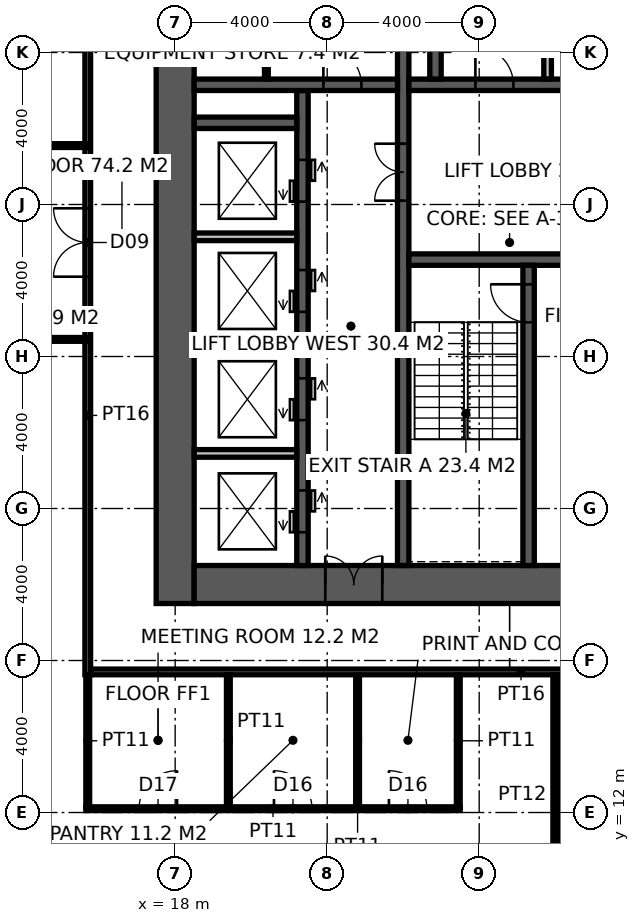
"""IFC4 building model, lengths in metres.
Left out: names, types, materials, properties, quantities, classifications, styles, units other than length and angle.
Written with IfcOpenShell. Run it as: python <this file> out.ifc"""

import sys

from ifc_helpers import new_model, si_unit, direction, frame, frame_2d, origin, place, context, subcontext, project, spatial, rectangle, extrude, element, fill, save


model = new_model("IFC4")
c1 = context("Model", 3, precision=1e-05, world=origin(), true_north=direction((0.0, 1.0)))
c2 = subcontext(c1, "Body", "Model", "MODEL_VIEW")
j1 = project(units=[si_unit("LENGTHUNIT", "METRE"), si_unit("PLANEANGLEUNIT", "RADIAN")], contexts=[c1])
p1 = place(None, origin())
s1 = spatial("IfcSite", under=j1, at=p1, CompositionType="ELEMENT")
p2 = place(p1, origin())
s2 = spatial("IfcBuilding", under=s1, at=p2, CompositionType="ELEMENT")
p3 = place(p2, frame((0.0, 0.0, 230.2)))
s3 = spatial("IfcBuildingStorey", under=s2, at=p3, CompositionType="ELEMENT", Elevation=230.2)
p4 = place(p3, frame((18.0, 17.5, -0.15), z_axis=(0.0, 0.0, 1.0), x_axis=(0.0, 1.0, 0.0)))
e1 = element("IfcWall", 1, at=p4, inside=s3, PredefinedType="SHEAR", context=c2, shape_type="SweptSolid", body=[
    extrude(rectangle(XDim=19.0, YDim=1.0, at=frame_2d((9.5, 0.0))), origin(), (0.0, 0.0, 1.0), 4.0),
])
p5 = place(p3, frame((18.5, 18.0, -0.15), z_axis=(0.0, 0.0, 1.0), x_axis=(1.0, 0.0, 0.0)))
e2 = element("IfcWall", 2, at=p5, inside=s3, PredefinedType="SHEAR", context=c2, shape_type="SweptSolid", body=[
    extrude(rectangle(XDim=17.6, YDim=1.0, at=frame_2d((8.8, 0.0))), origin(), (0.0, 0.0, 1.0), 4.0),
])
p6 = place(p5, frame((3.45, 0.0, 0.15)))
e3 = element("IfcOpeningElement", 3, at=p6, cuts=e2, PredefinedType="OPENING", context=c2, shape_type="SweptSolid", body=[
    extrude(rectangle(XDim=1.5, YDim=2.4, at=frame_2d((0.75, 1.2))), frame((0.0, 0.51, 0.0), z_axis=(0.0, -1.0, 0.0), x_axis=(1.0, 0.0, 0.0)), (0.0, 0.0, 1.0), 1.02),
])
p7 = place(p3, frame((24.0, 18.5, -0.15), z_axis=(0.0, 0.0, 1.0), x_axis=(0.0, 1.0, 0.0)))
e4 = element("IfcWall", 4, at=p7, inside=s3, PredefinedType="SHEAR", context=c2, shape_type="SweptSolid", body=[
    extrude(rectangle(XDim=17.0, YDim=0.3, at=frame_2d((8.5, 0.0))), origin(), (0.0, 0.0, 1.0), 4.0),
])
p8 = place(p7, frame((9.6, 0.0, 0.15)))
e5 = element("IfcOpeningElement", 5, at=p8, cuts=e4, PredefinedType="OPENING", context=c2, shape_type="SweptSolid", body=[
    extrude(rectangle(XDim=1.5, YDim=2.4, at=frame_2d((0.75, 1.2))), frame((0.0, 0.16, 0.0), z_axis=(0.0, -1.0, 0.0), x_axis=(1.0, 0.0, 0.0)), (0.0, 0.0, 1.0), 0.32),
])
p9 = place(p3, frame((24.15, 26.55, -0.15), z_axis=(0.0, 0.0, 1.0), x_axis=(1.0, 0.0, 0.0)))
e6 = element("IfcWall", 6, at=p9, inside=s3, PredefinedType="SHEAR", context=c2, shape_type="SweptSolid", body=[
    extrude(rectangle(XDim=11.25, YDim=0.3, at=frame_2d((5.625, 0.0))), origin(), (0.0, 0.0, 1.0), 4.0),
])
p10 = place(p9, frame((9.25, 0.0, 0.15)))
e7 = element("IfcOpeningElement", 7, at=p10, cuts=e6, PredefinedType="OPENING", context=c2, shape_type="SweptSolid", body=[
    extrude(rectangle(XDim=1.0, YDim=2.2, at=frame_2d((0.5, 1.1))), frame((0.0, 0.16, 0.0), z_axis=(0.0, -1.0, 0.0), x_axis=(1.0, 0.0, 0.0)), (0.0, 0.0, 1.0), 0.32),
])
p11 = place(p9, frame((4.9, 0.0, 0.15)))
e8 = element("IfcOpeningElement", 8, at=p11, cuts=e6, PredefinedType="OPENING", context=c2, shape_type="SweptSolid", body=[
    extrude(rectangle(XDim=1.5, YDim=2.4, at=frame_2d((0.75, 1.2))), frame((0.0, 0.16, 0.0), z_axis=(0.0, -1.0, 0.0), x_axis=(1.0, 0.0, 0.0)), (0.0, 0.0, 1.0), 0.32),
])
p12 = place(p3, frame((27.3, 18.5, -0.15), z_axis=(0.0, 0.0, 1.0), x_axis=(0.0, 1.0, 0.0)))
e9 = element("IfcWall", 9, at=p12, inside=s3, PredefinedType="SHEAR", context=c2, shape_type="SweptSolid", body=[
    extrude(rectangle(XDim=7.9, YDim=0.3, at=frame_2d((3.95, 0.0))), origin(), (0.0, 0.0, 1.0), 4.0),
])
p13 = place(p12, frame((6.4, 0.0, 0.15)))
e10 = element("IfcOpeningElement", 10, at=p13, cuts=e9, PredefinedType="OPENING", context=c2, shape_type="SweptSolid", body=[
    extrude(rectangle(XDim=1.0, YDim=2.2, at=frame_2d((0.5, 1.1))), frame((0.0, 0.16, 0.0), z_axis=(0.0, -1.0, 0.0), x_axis=(1.0, 0.0, 0.0)), (0.0, 0.0, 1.0), 0.32),
])
p14 = place(p3, frame((24.15, 31.15, -0.15), z_axis=(0.0, 0.0, 1.0), x_axis=(1.0, 0.0, 0.0)))
e11 = element("IfcWall", 11, at=p14, inside=s3, PredefinedType="SHEAR", context=c2, shape_type="SweptSolid", body=[
    extrude(rectangle(XDim=11.25, YDim=0.3, at=frame_2d((5.625, 0.0))), origin(), (0.0, 0.0, 1.0), 4.0),
])
p15 = place(p14, frame((1.75, 0.0, 0.15)))
e12 = element("IfcOpeningElement", 12, at=p15, cuts=e11, PredefinedType="OPENING", context=c2, shape_type="SweptSolid", body=[
    extrude(rectangle(XDim=1.0, YDim=2.2, at=frame_2d((0.5, 1.1))), frame((0.0, 0.16, 0.0), z_axis=(0.0, -1.0, 0.0), x_axis=(1.0, 0.0, 0.0)), (0.0, 0.0, 1.0), 0.32),
])
p16 = place(p14, frame((4.55, 0.0, 0.15)))
e13 = element("IfcOpeningElement", 13, at=p16, cuts=e11, PredefinedType="OPENING", context=c2, shape_type="SweptSolid", body=[
    extrude(rectangle(XDim=1.0, YDim=2.2, at=frame_2d((0.5, 1.1))), frame((0.0, 0.16, 0.0), z_axis=(0.0, -1.0, 0.0), x_axis=(1.0, 0.0, 0.0)), (0.0, 0.0, 1.0), 0.32),
])
p17 = place(p14, frame((7.25, 0.0, 0.15)))
e14 = element("IfcOpeningElement", 14, at=p17, cuts=e11, PredefinedType="OPENING", context=c2, shape_type="SweptSolid", body=[
    extrude(rectangle(XDim=1.4, YDim=2.4, at=frame_2d((0.7, 1.2))), frame((0.0, 0.16, 0.0), z_axis=(0.0, -1.0, 0.0), x_axis=(1.0, 0.0, 0.0)), (0.0, 0.0, 1.0), 0.32),
])
p18 = place(p3, frame((21.35, 18.5, -0.15), z_axis=(0.0, 0.0, 1.0), x_axis=(0.0, 1.0, 0.0)))
e15 = element("IfcWall", 15, at=p18, inside=s3, PredefinedType="SHEAR", context=c2, shape_type="SweptSolid", body=[
    extrude(rectangle(XDim=12.5, YDim=0.3, at=frame_2d((6.25, 0.0))), origin(), (0.0, 0.0, 1.0), 4.0),
])
p19 = place(p18, frame((0.875, 0.0, 0.15)))
e16 = element("IfcOpeningElement", 16, at=p19, cuts=e15, PredefinedType="OPENING", context=c2, shape_type="SweptSolid", body=[
    extrude(rectangle(XDim=1.1, YDim=2.2, at=frame_2d((0.55, 1.1))), frame((0.0, 0.16, 0.0), z_axis=(0.0, -1.0, 0.0), x_axis=(1.0, 0.0, 0.0)), (0.0, 0.0, 1.0), 0.32),
])
p20 = place(p18, frame((3.825, 0.0, 0.15)))
e17 = element("IfcOpeningElement", 17, at=p20, cuts=e15, PredefinedType="OPENING", context=c2, shape_type="SweptSolid", body=[
    extrude(rectangle(XDim=1.1, YDim=2.2, at=frame_2d((0.55, 1.1))), frame((0.0, 0.16, 0.0), z_axis=(0.0, -1.0, 0.0), x_axis=(1.0, 0.0, 0.0)), (0.0, 0.0, 1.0), 0.32),
])
p21 = place(p18, frame((6.675, 0.0, 0.15)))
e18 = element("IfcOpeningElement", 18, at=p21, cuts=e15, PredefinedType="OPENING", context=c2, shape_type="SweptSolid", body=[
    extrude(rectangle(XDim=1.1, YDim=2.2, at=frame_2d((0.55, 1.1))), frame((0.0, 0.16, 0.0), z_axis=(0.0, -1.0, 0.0), x_axis=(1.0, 0.0, 0.0)), (0.0, 0.0, 1.0), 0.32),
])
p22 = place(p18, frame((9.575, 0.0, 0.15)))
e19 = element("IfcOpeningElement", 19, at=p22, cuts=e15, PredefinedType="OPENING", context=c2, shape_type="SweptSolid", body=[
    extrude(rectangle(XDim=1.1, YDim=2.2, at=frame_2d((0.55, 1.1))), frame((0.0, 0.16, 0.0), z_axis=(0.0, -1.0, 0.0), x_axis=(1.0, 0.0, 0.0)), (0.0, 0.0, 1.0), 0.32),
])
p23 = place(p3, frame((18.5, 31.15, -0.15), z_axis=(0.0, 0.0, 1.0), x_axis=(1.0, 0.0, 0.0)))
e20 = element("IfcWall", 20, at=p23, inside=s3, PredefinedType="SHEAR", context=c2, shape_type="SweptSolid", body=[
    extrude(rectangle(XDim=5.35, YDim=0.3, at=frame_2d((2.675, 0.0))), origin(), (0.0, 0.0, 1.0), 4.0),
])
p24 = place(p23, frame((3.4, 0.0, 0.15)))
e21 = element("IfcOpeningElement", 21, at=p24, cuts=e20, PredefinedType="OPENING", context=c2, shape_type="SweptSolid", body=[
    extrude(rectangle(XDim=1.0, YDim=2.2, at=frame_2d((0.5, 1.1))), frame((0.0, 0.16, 0.0), z_axis=(0.0, -1.0, 0.0), x_axis=(1.0, 0.0, 0.0)), (0.0, 0.0, 1.0), 0.32),
])
p25 = place(p3, frame((18.5, 30.15, -0.15), z_axis=(0.0, 0.0, 1.0), x_axis=(1.0, 0.0, 0.0)))
e22 = element("IfcWall", 22, at=p25, inside=s3, PredefinedType="SHEAR", context=c2, shape_type="SweptSolid", body=[
    extrude(rectangle(XDim=2.7, YDim=0.3, at=frame_2d((1.35, 0.0))), origin(), (0.0, 0.0, 1.0), 4.0),
])
p26 = place(p3, frame((24.85, 31.3, -0.15), z_axis=(0.0, 0.0, 1.0), x_axis=(0.0, 1.0, 0.0)))
e23 = element("IfcWall", 23, at=p26, inside=s3, PredefinedType="SHEAR", context=c2, shape_type="SweptSolid", body=[
    extrude(rectangle(XDim=4.2, YDim=0.3, at=frame_2d((2.1, 0.0))), origin(), (0.0, 0.0, 1.0), 4.0),
])
p27 = place(p3, frame((27.8, 31.3, -0.15), z_axis=(0.0, 0.0, 1.0), x_axis=(0.0, 1.0, 0.0)))
e24 = element("IfcWall", 24, at=p27, inside=s3, PredefinedType="SOLIDWALL", context=c2, shape_type="SweptSolid", body=[
    extrude(rectangle(XDim=2.8, YDim=0.2, at=frame_2d((1.4, 0.0))), origin(), (0.0, 0.0, 1.0), 4.0),
])
for number, where, z_axis, x_axis in (
    (25, (18.5, 21.45, -0.15), (0.0, 0.0, 1.0), (1.0, 0.0, 0.0)),
    (26, (18.5, 24.3, -0.15), (0.0, 0.0, 1.0), (1.0, 0.0, 0.0)),
    (27, (18.5, 27.15, -0.15), (0.0, 0.0, 1.0), (1.0, 0.0, 0.0)),
):
    element("IfcWall", number, at=place(p3, frame(where, z_axis=z_axis, x_axis=x_axis)), inside=s3, PredefinedType="SOLIDWALL", context=c2, shape_type="SweptSolid", body=[
        extrude(rectangle(XDim=2.7, YDim=0.2, at=frame_2d((1.35, 0.0))), origin(), (0.0, 0.0, 1.0), 4.0),
    ])
p28 = place(p3, frame((20.4, 31.3, 0.0), z_axis=(0.0, 0.0, 1.0), x_axis=(0.0, 1.0, 0.0)))
e28 = element("IfcWall", 28, at=p28, inside=s3, PredefinedType="PARTITIONING", context=c2, shape_type="SweptSolid", body=[
    extrude(rectangle(XDim=4.2, YDim=0.1, at=frame_2d((2.1, 0.0))), origin(), (0.0, 0.0, 1.0), 3.85),
])
p29 = place(p28, frame((1.55, 0.0, 0.0)))
e29 = element("IfcOpeningElement", 29, at=p29, cuts=e28, PredefinedType="OPENING", context=c2, shape_type="SweptSolid", body=[
    extrude(rectangle(XDim=1.0, YDim=2.2, at=frame_2d((0.5, 1.1))), frame((0.0, 0.06, 0.0), z_axis=(0.0, -1.0, 0.0), x_axis=(1.0, 0.0, 0.0)), (0.0, 0.0, 1.0), 0.12),
])
p30 = place(p3, frame((15.7, 15.625, 0.0), z_axis=(0.0, 0.0, 1.0), x_axis=(0.0, 1.0, 0.0)))
e30 = element("IfcWall", 30, at=p30, inside=s3, PredefinedType="PARTITIONING", context=c2, shape_type="SweptSolid", body=[
    extrude(rectangle(XDim=22.75, YDim=0.15, at=frame_2d((11.375, 0.0))), origin(), (0.0, 0.0, 1.0), 3.85),
])
p31 = place(p30, frame((10.475, 0.0, 0.0)))
e31 = element("IfcOpeningElement", 31, at=p31, cuts=e30, PredefinedType="OPENING", context=c2, shape_type="SweptSolid", body=[
    extrude(rectangle(XDim=1.8, YDim=2.4, at=frame_2d((0.9, 1.2))), frame((0.0, 0.085, 0.0), z_axis=(0.0, -1.0, 0.0), x_axis=(1.0, 0.0, 0.0)), (0.0, 0.0, 1.0), 0.17),
])
p32 = place(p3, frame((15.775, 15.7, 0.0), z_axis=(0.0, 0.0, 1.0), x_axis=(1.0, 0.0, 0.0)))
e32 = element("IfcWall", 32, at=p32, inside=s3, PredefinedType="PARTITIONING", context=c2, shape_type="SweptSolid", body=[
    extrude(rectangle(XDim=22.65, YDim=0.15, at=frame_2d((11.325, 0.0))), origin(), (0.0, 0.0, 1.0), 3.85),
])
p33 = place(p3, frame((28.0, 8.3, 0.0), z_axis=(0.0, 0.0, 1.0), x_axis=(0.0, 1.0, 0.0)))
e33 = element("IfcWall", 33, at=p33, inside=s3, PredefinedType="PARTITIONING", context=c2, shape_type="SweptSolid", body=[
    extrude(rectangle(XDim=7.325, YDim=0.12, at=frame_2d((3.663, 0.0))), origin(), (0.0, 0.0, 1.0), 3.85),
])
p34 = place(p3, frame((28.06, 11.4, 0.0), z_axis=(0.0, 0.0, 1.0), x_axis=(1.0, 0.0, 0.0)))
e34 = element("IfcWall", 34, at=p34, inside=s3, PredefinedType="PARTITIONING", context=c2, shape_type="SweptSolid", body=[
    extrude(rectangle(XDim=2.74, YDim=0.1, at=frame_2d((1.37, 0.0))), origin(), (0.0, 0.0, 1.0), 3.85),
])
p35 = place(p3, frame((15.65, 12.1, 0.0), z_axis=(0.0, 0.0, 1.0), x_axis=(1.0, 0.0, 0.0)))
e35 = element("IfcWall", 35, at=p35, inside=s3, PredefinedType="PARTITIONING", context=c2, shape_type="SweptSolid", body=[
    extrude(rectangle(XDim=9.85, YDim=0.1, at=frame_2d((4.925, 0.0))), origin(), (0.0, 0.0, 1.0), 3.85),
])
p36 = place(p35, frame((1.4, 0.0, 0.0)))
e36 = element("IfcOpeningElement", 36, at=p36, cuts=e35, PredefinedType="OPENING", context=c2, shape_type="SweptSolid", body=[
    extrude(rectangle(XDim=1.0, YDim=2.2, at=frame_2d((0.5, 1.1))), frame((0.0, 0.06, 0.0), z_axis=(0.0, -1.0, 0.0), x_axis=(1.0, 0.0, 0.0)), (0.0, 0.0, 1.0), 0.12),
])
p37 = place(p35, frame((4.95, 0.0, 0.0)))
e37 = element("IfcOpeningElement", 37, at=p37, cuts=e35, PredefinedType="OPENING", context=c2, shape_type="SweptSolid", body=[
    extrude(rectangle(XDim=1.0, YDim=2.2, at=frame_2d((0.5, 1.1))), frame((0.0, 0.06, 0.0), z_axis=(0.0, -1.0, 0.0), x_axis=(1.0, 0.0, 0.0)), (0.0, 0.0, 1.0), 0.12),
])
p38 = place(p35, frame((7.975, 0.0, 0.0)))
e38 = element("IfcOpeningElement", 38, at=p38, cuts=e35, PredefinedType="OPENING", context=c2, shape_type="SweptSolid", body=[
    extrude(rectangle(XDim=1.0, YDim=2.2, at=frame_2d((0.5, 1.1))), frame((0.0, 0.06, 0.0), z_axis=(0.0, -1.0, 0.0), x_axis=(1.0, 0.0, 0.0)), (0.0, 0.0, 1.0), 0.12),
])
p39 = place(p3, frame((28.061, 12.1, 0.0), z_axis=(0.0, 0.0, 1.0), x_axis=(1.0, 0.0, 0.0)))
e39 = element("IfcWall", 39, at=p39, inside=s3, PredefinedType="PARTITIONING", context=c2, shape_type="SweptSolid", body=[
    extrude(rectangle(XDim=7.19, YDim=0.1, at=frame_2d((3.595, 0.0))), origin(), (0.0, 0.0, 1.0), 3.85),
])
p40 = place(p39, frame((2.79, 0.0, 0.0)))
e40 = element("IfcOpeningElement", 40, at=p40, cuts=e39, PredefinedType="OPENING", context=c2, shape_type="SweptSolid", body=[
    extrude(rectangle(XDim=1.8, YDim=2.4, at=frame_2d((0.9, 1.2))), frame((0.0, 0.06, 0.0), z_axis=(0.0, -1.0, 0.0), x_axis=(1.0, 0.0, 0.0)), (0.0, 0.0, 1.0), 0.12),
])
for number, where, z_axis, x_axis in (
    (41, (15.7, 12.15, 0.0), (0.0, 0.0, 1.0), (0.0, 1.0, 0.0)),
    (42, (19.4, 12.15, 0.0), (0.0, 0.0, 1.0), (0.0, 1.0, 0.0)),
    (43, (22.8, 12.15, 0.0), (0.0, 0.0, 1.0), (0.0, 1.0, 0.0)),
    (44, (25.45, 12.15, 0.0), (0.0, 0.0, 1.0), (0.0, 1.0, 0.0)),
):
    element("IfcWall", number, at=place(p3, frame(where, z_axis=z_axis, x_axis=x_axis)), inside=s3, PredefinedType="PARTITIONING", context=c2, shape_type="SweptSolid", body=[
        extrude(rectangle(XDim=3.475, YDim=0.1, at=frame_2d((1.738, 0.0))), origin(), (0.0, 0.0, 1.0), 3.85),
    ])
p41 = place(p3, frame((15.7, 29.55, 0.0), z_axis=(0.0, 0.0, 1.0), x_axis=(-1.0, 0.0, 0.0)))
e45 = element("IfcWall", 45, at=p41, inside=s3, PredefinedType="PARTITIONING", context=c2, shape_type="SweptSolid", body=[
    extrude(rectangle(XDim=4.5, YDim=0.1, at=frame_2d((2.25, 0.0))), origin(), (0.0, 0.0, 1.0), 3.85),
])
p42 = place(p3, frame((11.2, 24.45, 0.0), z_axis=(0.0, 0.0, 1.0), x_axis=(1.0, 0.0, 0.0)))
e46 = element("IfcWall", 46, at=p42, inside=s3, PredefinedType="PARTITIONING", context=c2, shape_type="SweptSolid", body=[
    extrude(rectangle(XDim=4.5, YDim=0.1, at=frame_2d((2.25, 0.0))), origin(), (0.0, 0.0, 1.0), 2.95),
])
p43 = place(p13, origin())
e47 = element("IfcDoor", 47, at=p43, inside=s3, OperationType="SINGLE_SWING_RIGHT", PredefinedType="DOOR", context=c2, shape_type="SweptSolid", body=[
    extrude(rectangle(XDim=1.0, YDim=2.2, at=frame_2d((0.5, 1.1))), frame((0.0, 0.025, 0.0), z_axis=(0.0, -1.0, 0.0), x_axis=(1.0, 0.0, 0.0)), (0.0, 0.0, 1.0), 0.05),
])
fill(e10, e47)
p44 = place(p8, origin())
e48 = element("IfcDoor", 48, at=p44, inside=s3, OperationType="DOUBLE_DOOR_DOUBLE_SWING", PredefinedType="DOOR", context=c2, shape_type="SweptSolid", body=[
    extrude(rectangle(XDim=1.5, YDim=2.4, at=frame_2d((0.75, 1.2))), frame((0.0, 0.025, 0.0), z_axis=(0.0, -1.0, 0.0), x_axis=(1.0, 0.0, 0.0)), (0.0, 0.0, 1.0), 0.05),
])
fill(e5, e48)
p45 = place(p24, origin())
e49 = element("IfcDoor", 49, at=p45, inside=s3, OperationType="SINGLE_SWING_LEFT", PredefinedType="DOOR", context=c2, shape_type="SweptSolid", body=[
    extrude(rectangle(XDim=1.0, YDim=2.2, at=frame_2d((0.5, 1.1))), frame((0.0, 0.025, 0.0), z_axis=(0.0, -1.0, 0.0), x_axis=(1.0, 0.0, 0.0)), (0.0, 0.0, 1.0), 0.05),
])
fill(e21, e49)
p46 = place(p15, origin())
e50 = element("IfcDoor", 50, at=p46, inside=s3, OperationType="SINGLE_SWING_LEFT", PredefinedType="DOOR", context=c2, shape_type="SweptSolid", body=[
    extrude(rectangle(XDim=1.0, YDim=2.2, at=frame_2d((0.5, 1.1))), frame((0.0, 0.025, 0.0), z_axis=(0.0, -1.0, 0.0), x_axis=(1.0, 0.0, 0.0)), (0.0, 0.0, 1.0), 0.05),
])
fill(e12, e50)
p47 = place(p6, origin())
e51 = element("IfcDoor", 51, at=p47, inside=s3, OperationType="DOUBLE_DOOR_DOUBLE_SWING", PredefinedType="DOOR", context=c2, shape_type="SweptSolid", body=[
    extrude(rectangle(XDim=1.5, YDim=2.4, at=frame_2d((0.75, 1.2))), frame((0.0, 0.025, 0.0), z_axis=(0.0, -1.0, 0.0), x_axis=(1.0, 0.0, 0.0)), (0.0, 0.0, 1.0), 0.05),
])
fill(e3, e51)
p48 = place(p31, origin())
e52 = element("IfcDoor", 52, at=p48, inside=s3, OperationType="DOUBLE_DOOR_DOUBLE_SWING", PredefinedType="DOOR", context=c2, shape_type="SweptSolid", body=[
    extrude(rectangle(XDim=1.8, YDim=2.4, at=frame_2d((0.9, 1.2))), frame((0.0, 0.025, 0.0), z_axis=(0.0, -1.0, 0.0), x_axis=(1.0, 0.0, 0.0)), (0.0, 0.0, 1.0), 0.05),
])
fill(e31, e52)
p49 = place(p36, origin())
e53 = element("IfcDoor", 53, at=p49, inside=s3, OperationType="SINGLE_SWING_RIGHT", PredefinedType="DOOR", context=c2, shape_type="SweptSolid", body=[
    extrude(rectangle(XDim=1.0, YDim=2.2, at=frame_2d((0.5, 1.1))), frame((0.0, 0.025, 0.0), z_axis=(0.0, -1.0, 0.0), x_axis=(1.0, 0.0, 0.0)), (0.0, 0.0, 1.0), 0.05),
])
fill(e36, e53)
p50 = place(p37, origin())
e54 = element("IfcDoor", 54, at=p50, inside=s3, OperationType="SINGLE_SWING_LEFT", PredefinedType="DOOR", context=c2, shape_type="SweptSolid", body=[
    extrude(rectangle(XDim=1.0, YDim=2.2, at=frame_2d((0.5, 1.1))), frame((0.0, 0.025, 0.0), z_axis=(0.0, -1.0, 0.0), x_axis=(1.0, 0.0, 0.0)), (0.0, 0.0, 1.0), 0.05),
])
fill(e37, e54)
p51 = place(p38, origin())
e55 = element("IfcDoor", 55, at=p51, inside=s3, OperationType="SINGLE_SWING_LEFT", PredefinedType="DOOR", context=c2, shape_type="SweptSolid", body=[
    extrude(rectangle(XDim=1.0, YDim=2.2, at=frame_2d((0.5, 1.1))), frame((0.0, 0.025, 0.0), z_axis=(0.0, -1.0, 0.0), x_axis=(1.0, 0.0, 0.0)), (0.0, 0.0, 1.0), 0.05),
])
fill(e38, e55)
p52 = place(p19, origin())
e56 = element("IfcDoor", 56, at=p52, inside=s3, OperationType="DOUBLE_DOOR_SLIDING", PredefinedType="DOOR", context=c2, shape_type="SweptSolid", body=[
    extrude(rectangle(XDim=1.1, YDim=2.2, at=frame_2d((0.55, 1.1))), frame((0.0, 0.025, 0.0), z_axis=(0.0, -1.0, 0.0), x_axis=(1.0, 0.0, 0.0)), (0.0, 0.0, 1.0), 0.05),
])
fill(e16, e56)
p53 = place(p20, origin())
e57 = element("IfcDoor", 57, at=p53, inside=s3, OperationType="DOUBLE_DOOR_SLIDING", PredefinedType="DOOR", context=c2, shape_type="SweptSolid", body=[
    extrude(rectangle(XDim=1.1, YDim=2.2, at=frame_2d((0.55, 1.1))), frame((0.0, 0.025, 0.0), z_axis=(0.0, -1.0, 0.0), x_axis=(1.0, 0.0, 0.0)), (0.0, 0.0, 1.0), 0.05),
])
fill(e17, e57)
p54 = place(p21, origin())
e58 = element("IfcDoor", 58, at=p54, inside=s3, OperationType="DOUBLE_DOOR_SLIDING", PredefinedType="DOOR", context=c2, shape_type="SweptSolid", body=[
    extrude(rectangle(XDim=1.1, YDim=2.2, at=frame_2d((0.55, 1.1))), frame((0.0, 0.025, 0.0), z_axis=(0.0, -1.0, 0.0), x_axis=(1.0, 0.0, 0.0)), (0.0, 0.0, 1.0), 0.05),
])
fill(e18, e58)
p55 = place(p22, origin())
e59 = element("IfcDoor", 59, at=p55, inside=s3, OperationType="DOUBLE_DOOR_SLIDING", PredefinedType="DOOR", context=c2, shape_type="SweptSolid", body=[
    extrude(rectangle(XDim=1.1, YDim=2.2, at=frame_2d((0.55, 1.1))), frame((0.0, 0.025, 0.0), z_axis=(0.0, -1.0, 0.0), x_axis=(1.0, 0.0, 0.0)), (0.0, 0.0, 1.0), 0.05),
])
fill(e19, e59)
save(model, sys.argv[1])
